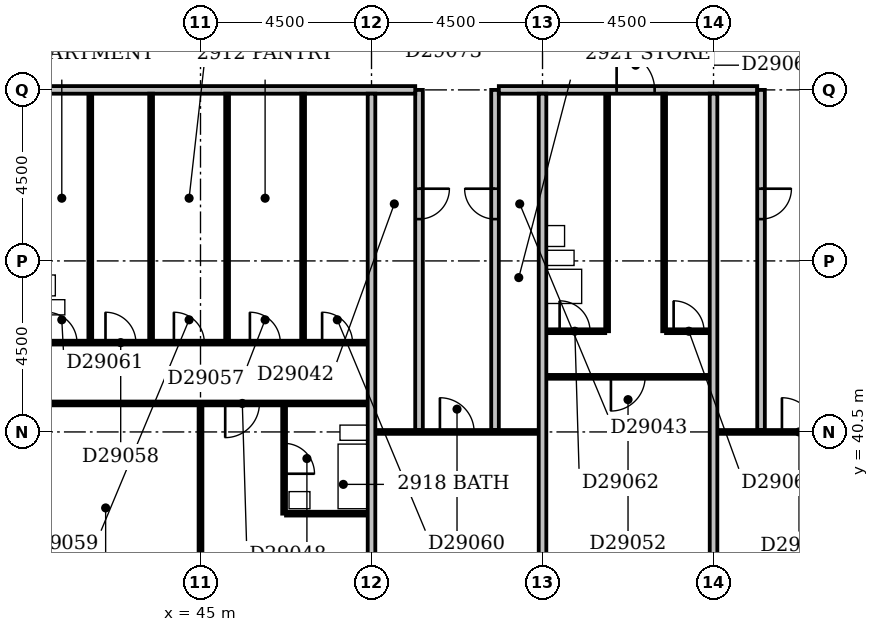
"""IFC4 building model, lengths in metres.
Left out: names, types, materials, properties, quantities, classifications, styles, units other than length and angle.
Written with IfcOpenShell. Run it as: python <this file> out.ifc"""

import sys

from ifc_helpers import new_model, si_unit, direction, frame, frame_2d, origin, place, context, subcontext, project, spatial, rectangle, extrude, element, fill, save


model = new_model("IFC4")
c1 = context("Model", 3, precision=1e-05, world=origin(), true_north=direction((0.0, 1.0)))
c2 = subcontext(c1, "Body", "Model", "MODEL_VIEW")
j1 = project(units=[si_unit("LENGTHUNIT", "METRE"), si_unit("PLANEANGLEUNIT", "RADIAN")], contexts=[c1])
p1 = place(None, origin())
s1 = spatial("IfcSite", under=j1, at=p1, CompositionType="ELEMENT")
p2 = place(p1, origin())
s2 = spatial("IfcBuilding", under=s1, at=p2, CompositionType="ELEMENT")
p3 = place(p2, frame((0.0, 0.0, 119.6)))
s3 = spatial("IfcBuildingStorey", under=s2, at=p3, CompositionType="ELEMENT", Elevation=119.6)
p4 = place(p3, frame((45.0, 36.5, 0.0), z_axis=(0.0, 0.0, 1.0), x_axis=(0.0, 1.0, 0.0)))
e1 = element("IfcWall", 1, at=p4, inside=s3, PredefinedType="PARTITIONING", context=c2, shape_type="SweptSolid", body=[
    extrude(rectangle(XDim=4.7, YDim=0.1, at=frame_2d((2.35, 0.0))), origin(), (0.0, 0.0, 1.0), 2.6),
])
p5 = place(p3, frame((49.5, 36.5, 0.0), z_axis=(0.0, 0.0, 1.0), x_axis=(0.0, 1.0, 0.0)))
e2 = element("IfcWall", 2, at=p5, inside=s3, PredefinedType="PARTITIONING", context=c2, shape_type="SweptSolid", body=[
    extrude(rectangle(XDim=12.9, YDim=0.2, at=frame_2d((6.45, 0.0))), origin(), (0.0, 0.0, 1.0), 3.3),
])
p6 = place(p3, frame((54.0, 36.5, 0.0), z_axis=(0.0, 0.0, 1.0), x_axis=(0.0, 1.0, 0.0)))
e3 = element("IfcWall", 3, at=p6, inside=s3, PredefinedType="PARTITIONING", context=c2, shape_type="SweptSolid", body=[
    extrude(rectangle(XDim=12.9, YDim=0.2, at=frame_2d((6.45, 0.0))), origin(), (0.0, 0.0, 1.0), 2.6),
])
p7 = place(p3, frame((58.5, 36.5, 0.0), z_axis=(0.0, 0.0, 1.0), x_axis=(0.0, 1.0, 0.0)))
e4 = element("IfcWall", 4, at=p7, inside=s3, PredefinedType="PARTITIONING", context=c2, shape_type="SweptSolid", body=[
    extrude(rectangle(XDim=12.9, YDim=0.2, at=frame_2d((6.45, 0.0))), origin(), (0.0, 0.0, 1.0), 3.3),
])
p8 = place(p3, frame((47.2, 38.35, 0.0), z_axis=(0.0, 0.0, 1.0), x_axis=(0.0, 1.0, 0.0)))
e5 = element("IfcWall", 5, at=p8, inside=s3, PredefinedType="PLUMBINGWALL", context=c2, shape_type="SweptSolid", body=[
    extrude(rectangle(XDim=2.85, YDim=0.1, at=frame_2d((1.425, 0.0))), origin(), (0.0, 0.0, 1.0), 3.3),
])
p9 = place(p8, frame((1.05, 0.0, 0.0)))
e6 = element("IfcOpeningElement", 6, at=p9, cuts=e5, PredefinedType="OPENING", context=c2, shape_type="SweptSolid", body=[
    extrude(rectangle(XDim=0.8, YDim=2.1, at=frame_2d((0.4, 1.05))), frame((0.0, 0.062, 0.0), z_axis=(0.0, -1.0, 0.0), x_axis=(1.0, 0.0, 0.0)), (0.0, 0.0, 1.0), 0.124),
])
p10 = place(p3, frame((47.25, 38.35, 0.0), z_axis=(0.0, 0.0, 1.0), x_axis=(1.0, 0.0, 0.0)))
e7 = element("IfcWall", 7, at=p10, inside=s3, PredefinedType="PLUMBINGWALL", context=c2, shape_type="SweptSolid", body=[
    extrude(rectangle(XDim=2.15, YDim=0.1, at=frame_2d((1.075, 0.0))), origin(), (0.0, 0.0, 1.0), 3.3),
])
p11 = place(p3, frame((49.6, 40.5, 0.0), z_axis=(0.0, 0.0, 1.0), x_axis=(1.0, 0.0, 0.0)))
e8 = element("IfcWall", 8, at=p11, inside=s3, PredefinedType="PARTITIONING", context=c2, shape_type="SweptSolid", body=[
    extrude(rectangle(XDim=4.3, YDim=0.1, at=frame_2d((2.15, 0.0))), origin(), (0.0, 0.0, 1.0), 3.3),
])
p12 = place(p11, frame((1.7, 0.0, 0.0)))
e9 = element("IfcOpeningElement", 9, at=p12, cuts=e8, PredefinedType="OPENING", context=c2, shape_type="SweptSolid", body=[
    extrude(rectangle(XDim=0.9, YDim=2.1, at=frame_2d((0.45, 1.05))), frame((0.0, 0.062, 0.0), z_axis=(0.0, -1.0, 0.0), x_axis=(1.0, 0.0, 0.0)), (0.0, 0.0, 1.0), 0.124),
])
p13 = place(p3, frame((58.6, 40.5, 0.0), z_axis=(0.0, 0.0, 1.0), x_axis=(1.0, 0.0, 0.0)))
e10 = element("IfcWall", 10, at=p13, inside=s3, PredefinedType="PARTITIONING", context=c2, shape_type="SweptSolid", body=[
    extrude(rectangle(XDim=4.3, YDim=0.1, at=frame_2d((2.15, 0.0))), origin(), (0.0, 0.0, 1.0), 3.3),
])
p14 = place(p13, frame((1.7, 0.0, 0.0)))
e11 = element("IfcOpeningElement", 11, at=p14, cuts=e10, PredefinedType="OPENING", context=c2, shape_type="SweptSolid", body=[
    extrude(rectangle(XDim=0.9, YDim=2.1, at=frame_2d((0.45, 1.05))), frame((0.0, 0.062, 0.0), z_axis=(0.0, -1.0, 0.0), x_axis=(1.0, 0.0, 0.0)), (0.0, 0.0, 1.0), 0.124),
])
p15 = place(p3, frame((50.75, 40.55, 0.0), z_axis=(0.0, 0.0, 1.0), x_axis=(0.0, 1.0, 0.0)))
e12 = element("IfcWall", 12, at=p15, inside=s3, PredefinedType="PARTITIONING", context=c2, shape_type="SweptSolid", body=[
    extrude(rectangle(XDim=8.95, YDim=0.2, at=frame_2d((4.475, 0.0))), origin(), (0.0, 0.0, 1.0), 3.3),
])
p16 = place(p15, frame((5.55, 0.0, 0.0)))
e13 = element("IfcOpeningElement", 13, at=p16, cuts=e12, PredefinedType="OPENING", context=c2, shape_type="SweptSolid", body=[
    extrude(rectangle(XDim=0.8, YDim=2.1, at=frame_2d((0.4, 1.05))), frame((0.0, 0.112, 0.0), z_axis=(0.0, -1.0, 0.0), x_axis=(1.0, 0.0, 0.0)), (0.0, 0.0, 1.0), 0.224),
])
p17 = place(p3, frame((52.75, 40.55, 0.0), z_axis=(0.0, 0.0, 1.0), x_axis=(0.0, 1.0, 0.0)))
e14 = element("IfcWall", 14, at=p17, inside=s3, PredefinedType="PARTITIONING", context=c2, shape_type="SweptSolid", body=[
    extrude(rectangle(XDim=8.95, YDim=0.2, at=frame_2d((4.475, 0.0))), origin(), (0.0, 0.0, 1.0), 3.3),
])
p18 = place(p17, frame((5.55, 0.0, 0.0)))
e15 = element("IfcOpeningElement", 15, at=p18, cuts=e14, PredefinedType="OPENING", context=c2, shape_type="SweptSolid", body=[
    extrude(rectangle(XDim=0.8, YDim=2.1, at=frame_2d((0.4, 1.05))), frame((0.0, 0.112, 0.0), z_axis=(0.0, -1.0, 0.0), x_axis=(1.0, 0.0, 0.0)), (0.0, 0.0, 1.0), 0.224),
])
p19 = place(p3, frame((59.75, 40.55, 0.0), z_axis=(0.0, 0.0, 1.0), x_axis=(0.0, 1.0, 0.0)))
e16 = element("IfcWall", 16, at=p19, inside=s3, PredefinedType="PARTITIONING", context=c2, shape_type="SweptSolid", body=[
    extrude(rectangle(XDim=8.95, YDim=0.2, at=frame_2d((4.475, 0.0))), origin(), (0.0, 0.0, 1.0), 3.3),
])
p20 = place(p19, frame((5.55, 0.0, 0.0)))
e17 = element("IfcOpeningElement", 17, at=p20, cuts=e16, PredefinedType="OPENING", context=c2, shape_type="SweptSolid", body=[
    extrude(rectangle(XDim=0.8, YDim=2.1, at=frame_2d((0.4, 1.05))), frame((0.0, 0.112, 0.0), z_axis=(0.0, -1.0, 0.0), x_axis=(1.0, 0.0, 0.0)), (0.0, 0.0, 1.0), 0.224),
])
p21 = place(p3, frame((31.6, 41.25, 0.0), z_axis=(0.0, 0.0, 1.0), x_axis=(1.0, 0.0, 0.0)))
e18 = element("IfcWall", 18, at=p21, inside=s3, PredefinedType="PARTITIONING", context=c2, shape_type="SweptSolid", body=[
    extrude(rectangle(XDim=17.8, YDim=0.1, at=frame_2d((8.9, 0.0))), origin(), (0.0, 0.0, 1.0), 3.3),
])
p22 = place(p21, frame((2.85, 0.0, 0.0)))
e19 = element("IfcOpeningElement", 19, at=p22, cuts=e18, PredefinedType="OPENING", context=c2, shape_type="SweptSolid", body=[
    extrude(rectangle(XDim=0.9, YDim=2.1, at=frame_2d((0.45, 1.05))), frame((0.0, 0.062, 0.0), z_axis=(0.0, -1.0, 0.0), x_axis=(1.0, 0.0, 0.0)), (0.0, 0.0, 1.0), 0.124),
])
p23 = place(p21, frame((8.4, 0.0, 0.0)))
e20 = element("IfcOpeningElement", 20, at=p23, cuts=e18, PredefinedType="OPENING", context=c2, shape_type="SweptSolid", body=[
    extrude(rectangle(XDim=0.9, YDim=2.1, at=frame_2d((0.45, 1.05))), frame((0.0, 0.062, 0.0), z_axis=(0.0, -1.0, 0.0), x_axis=(1.0, 0.0, 0.0)), (0.0, 0.0, 1.0), 0.124),
])
p24 = place(p21, frame((14.05, 0.0, 0.0)))
e21 = element("IfcOpeningElement", 21, at=p24, cuts=e18, PredefinedType="OPENING", context=c2, shape_type="SweptSolid", body=[
    extrude(rectangle(XDim=0.9, YDim=2.1, at=frame_2d((0.45, 1.05))), frame((0.0, 0.062, 0.0), z_axis=(0.0, -1.0, 0.0), x_axis=(1.0, 0.0, 0.0)), (0.0, 0.0, 1.0), 0.124),
])
p25 = place(p3, frame((54.1, 41.95, 0.0), z_axis=(0.0, 0.0, 1.0), x_axis=(1.0, 0.0, 0.0)))
e22 = element("IfcWall", 22, at=p25, inside=s3, PredefinedType="PARTITIONING", context=c2, shape_type="SweptSolid", body=[
    extrude(rectangle(XDim=4.3, YDim=0.1, at=frame_2d((2.15, 0.0))), origin(), (0.0, 0.0, 1.0), 3.3),
])
p26 = place(p25, frame((1.7, 0.0, 0.0)))
e23 = element("IfcOpeningElement", 23, at=p26, cuts=e22, PredefinedType="OPENING", context=c2, shape_type="SweptSolid", body=[
    extrude(rectangle(XDim=0.9, YDim=2.1, at=frame_2d((0.45, 1.05))), frame((0.0, 0.062, 0.0), z_axis=(0.0, -1.0, 0.0), x_axis=(1.0, 0.0, 0.0)), (0.0, 0.0, 1.0), 0.124),
])
p27 = place(p3, frame((38.25, 42.85, 0.0), z_axis=(0.0, 0.0, 1.0), x_axis=(1.0, 0.0, 0.0)))
e24 = element("IfcWall", 24, at=p27, inside=s3, PredefinedType="PARTITIONING", context=c2, shape_type="SweptSolid", body=[
    extrude(rectangle(XDim=11.15, YDim=0.1, at=frame_2d((5.575, 0.0))), origin(), (0.0, 0.0, 1.0), 3.3),
])
p28 = place(p27, frame((0.75, 0.0, 0.0)))
e25 = element("IfcOpeningElement", 25, at=p28, cuts=e24, PredefinedType="OPENING", context=c2, shape_type="SweptSolid", body=[
    extrude(rectangle(XDim=0.8, YDim=2.1, at=frame_2d((0.4, 1.05))), frame((0.0, 0.062, 0.0), z_axis=(0.0, -1.0, 0.0), x_axis=(1.0, 0.0, 0.0)), (0.0, 0.0, 1.0), 0.124),
])
p29 = place(p27, frame((8.05, 0.0, 0.0)))
e26 = element("IfcOpeningElement", 26, at=p29, cuts=e24, PredefinedType="OPENING", context=c2, shape_type="SweptSolid", body=[
    extrude(rectangle(XDim=0.8, YDim=2.1, at=frame_2d((0.4, 1.05))), frame((0.0, 0.062, 0.0), z_axis=(0.0, -1.0, 0.0), x_axis=(1.0, 0.0, 0.0)), (0.0, 0.0, 1.0), 0.124),
])
p30 = place(p27, frame((4.25, 0.0, 0.0)))
e27 = element("IfcOpeningElement", 27, at=p30, cuts=e24, PredefinedType="OPENING", context=c2, shape_type="SweptSolid", body=[
    extrude(rectangle(XDim=0.8, YDim=2.1, at=frame_2d((0.4, 1.05))), frame((0.0, 0.062, 0.0), z_axis=(0.0, -1.0, 0.0), x_axis=(1.0, 0.0, 0.0)), (0.0, 0.0, 1.0), 0.124),
])
p31 = place(p27, frame((6.05, 0.0, 0.0)))
e28 = element("IfcOpeningElement", 28, at=p31, cuts=e24, PredefinedType="OPENING", context=c2, shape_type="SweptSolid", body=[
    extrude(rectangle(XDim=0.8, YDim=2.1, at=frame_2d((0.4, 1.05))), frame((0.0, 0.062, 0.0), z_axis=(0.0, -1.0, 0.0), x_axis=(1.0, 0.0, 0.0)), (0.0, 0.0, 1.0), 0.124),
])
p32 = place(p27, frame((9.95, 0.0, 0.0)))
e29 = element("IfcOpeningElement", 29, at=p32, cuts=e24, PredefinedType="OPENING", context=c2, shape_type="SweptSolid", body=[
    extrude(rectangle(XDim=0.8, YDim=2.1, at=frame_2d((0.4, 1.05))), frame((0.0, 0.062, 0.0), z_axis=(0.0, -1.0, 0.0), x_axis=(1.0, 0.0, 0.0)), (0.0, 0.0, 1.0), 0.124),
])
p33 = place(p27, frame((2.7, 0.0, 0.0)))
e30 = element("IfcOpeningElement", 30, at=p33, cuts=e24, PredefinedType="OPENING", context=c2, shape_type="SweptSolid", body=[
    extrude(rectangle(XDim=0.8, YDim=2.1, at=frame_2d((0.4, 1.05))), frame((0.0, 0.062, 0.0), z_axis=(0.0, -1.0, 0.0), x_axis=(1.0, 0.0, 0.0)), (0.0, 0.0, 1.0), 0.124),
])
p34 = place(p3, frame((42.1, 42.9, 0.0), z_axis=(0.0, 0.0, 1.0), x_axis=(0.0, 1.0, 0.0)))
e31 = element("IfcWall", 31, at=p34, inside=s3, PredefinedType="PLUMBINGWALL", context=c2, shape_type="SweptSolid", body=[
    extrude(rectangle(XDim=6.5, YDim=0.1, at=frame_2d((3.25, 0.0))), origin(), (0.0, 0.0, 1.0), 3.3),
])
p35 = place(p3, frame((43.7, 42.9, 0.0), z_axis=(0.0, 0.0, 1.0), x_axis=(0.0, 1.0, 0.0)))
e32 = element("IfcWall", 32, at=p35, inside=s3, PredefinedType="PARTITIONING", context=c2, shape_type="SweptSolid", body=[
    extrude(rectangle(XDim=6.5, YDim=0.1, at=frame_2d((3.25, 0.0))), origin(), (0.0, 0.0, 1.0), 3.3),
])
p36 = place(p3, frame((45.7, 42.9, 0.0), z_axis=(0.0, 0.0, 1.0), x_axis=(0.0, 1.0, 0.0)))
e33 = element("IfcWall", 33, at=p36, inside=s3, PredefinedType="PARTITIONING", context=c2, shape_type="SweptSolid", body=[
    extrude(rectangle(XDim=6.5, YDim=0.1, at=frame_2d((3.25, 0.0))), origin(), (0.0, 0.0, 1.0), 2.6),
])
p37 = place(p3, frame((47.7, 42.9, 0.0), z_axis=(0.0, 0.0, 1.0), x_axis=(0.0, 1.0, 0.0)))
e34 = element("IfcWall", 34, at=p37, inside=s3, PredefinedType="PARTITIONING", context=c2, shape_type="SweptSolid", body=[
    extrude(rectangle(XDim=6.5, YDim=0.1, at=frame_2d((3.25, 0.0))), origin(), (0.0, 0.0, 1.0), 3.3),
])
p38 = place(p3, frame((54.1, 43.15, 0.0), z_axis=(0.0, 0.0, 1.0), x_axis=(1.0, 0.0, 0.0)))
e35 = element("IfcWall", 35, at=p38, inside=s3, PredefinedType="PARTITIONING", context=c2, shape_type="SweptSolid", body=[
    extrude(rectangle(XDim=1.55, YDim=0.1, at=frame_2d((0.775, 0.0))), origin(), (0.0, 0.0, 1.0), 3.3),
])
p39 = place(p38, frame((0.35, 0.0, 0.0)))
e36 = element("IfcOpeningElement", 36, at=p39, cuts=e35, PredefinedType="OPENING", context=c2, shape_type="SweptSolid", body=[
    extrude(rectangle(XDim=0.8, YDim=2.1, at=frame_2d((0.4, 1.05))), frame((0.0, 0.062, 0.0), z_axis=(0.0, -1.0, 0.0), x_axis=(1.0, 0.0, 0.0)), (0.0, 0.0, 1.0), 0.124),
])
p40 = place(p3, frame((55.7, 43.15, 0.0), z_axis=(0.0, 0.0, 1.0), x_axis=(0.0, 1.0, 0.0)))
e37 = element("IfcWall", 37, at=p40, inside=s3, PredefinedType="PLUMBINGWALL", context=c2, shape_type="SweptSolid", body=[
    extrude(rectangle(XDim=6.25, YDim=0.1, at=frame_2d((3.125, 0.0))), origin(), (0.0, 0.0, 1.0), 3.3),
])
p41 = place(p3, frame((57.2, 43.15, 0.0), z_axis=(0.0, 0.0, 1.0), x_axis=(0.0, 1.0, 0.0)))
e38 = element("IfcWall", 38, at=p41, inside=s3, PredefinedType="PARTITIONING", context=c2, shape_type="SweptSolid", body=[
    extrude(rectangle(XDim=6.25, YDim=0.1, at=frame_2d((3.125, 0.0))), origin(), (0.0, 0.0, 1.0), 3.3),
])
p42 = place(p3, frame((57.25, 43.15, 0.0), z_axis=(0.0, 0.0, 1.0), x_axis=(1.0, 0.0, 0.0)))
e39 = element("IfcWall", 39, at=p42, inside=s3, PredefinedType="PARTITIONING", context=c2, shape_type="SweptSolid", body=[
    extrude(rectangle(XDim=1.15, YDim=0.1, at=frame_2d((0.575, 0.0))), origin(), (0.0, 0.0, 1.0), 3.3),
])
p43 = place(p42, frame((0.2, 0.0, 0.0)))
e40 = element("IfcOpeningElement", 40, at=p43, cuts=e39, PredefinedType="OPENING", context=c2, shape_type="SweptSolid", body=[
    extrude(rectangle(XDim=0.8, YDim=2.1, at=frame_2d((0.4, 1.05))), frame((0.0, 0.062, 0.0), z_axis=(0.0, -1.0, 0.0), x_axis=(1.0, 0.0, 0.0)), (0.0, 0.0, 1.0), 0.124),
])
p44 = place(p3, frame((9.1, 49.5, 0.0), z_axis=(0.0, 0.0, 1.0), x_axis=(1.0, 0.0, 0.0)))
e41 = element("IfcWall", 41, at=p44, inside=s3, PredefinedType="PARTITIONING", context=c2, shape_type="SweptSolid", body=[
    extrude(rectangle(XDim=41.55, YDim=0.2, at=frame_2d((20.775, 0.0))), origin(), (0.0, 0.0, 1.0), 3.3),
])
p45 = place(p44, frame((13.7, 0.0, 0.0)))
e42 = element("IfcOpeningElement", 42, at=p45, cuts=e41, PredefinedType="OPENING", context=c2, shape_type="SweptSolid", body=[
    extrude(rectangle(XDim=1.0, YDim=2.1, at=frame_2d((0.5, 1.05))), frame((0.0, 0.112, 0.0), z_axis=(0.0, -1.0, 0.0), x_axis=(1.0, 0.0, 0.0)), (0.0, 0.0, 1.0), 0.224),
])
p46 = place(p44, frame((27.8, 0.0, 0.0)))
e43 = element("IfcOpeningElement", 43, at=p46, cuts=e41, PredefinedType="OPENING", context=c2, shape_type="SweptSolid", body=[
    extrude(rectangle(XDim=1.0, YDim=2.1, at=frame_2d((0.5, 1.05))), frame((0.0, 0.112, 0.0), z_axis=(0.0, -1.0, 0.0), x_axis=(1.0, 0.0, 0.0)), (0.0, 0.0, 1.0), 0.224),
])
p47 = place(p44, frame((8.4, 0.0, 0.0)))
e44 = element("IfcOpeningElement", 44, at=p47, cuts=e41, PredefinedType="OPENING", context=c2, shape_type="SweptSolid", body=[
    extrude(rectangle(XDim=0.9, YDim=2.1, at=frame_2d((0.45, 1.05))), frame((0.0, 0.112, 0.0), z_axis=(0.0, -1.0, 0.0), x_axis=(1.0, 0.0, 0.0)), (0.0, 0.0, 1.0), 0.224),
])
p48 = place(p3, frame((52.85, 49.5, 0.0), z_axis=(0.0, 0.0, 1.0), x_axis=(1.0, 0.0, 0.0)))
e45 = element("IfcWall", 45, at=p48, inside=s3, PredefinedType="PARTITIONING", context=c2, shape_type="SweptSolid", body=[
    extrude(rectangle(XDim=6.8, YDim=0.2, at=frame_2d((3.4, 0.0))), origin(), (0.0, 0.0, 1.0), 3.3),
])
p49 = place(p48, frame((3.1, 0.0, 0.0)))
e46 = element("IfcOpeningElement", 46, at=p49, cuts=e45, PredefinedType="OPENING", context=c2, shape_type="SweptSolid", body=[
    extrude(rectangle(XDim=1.0, YDim=2.1, at=frame_2d((0.5, 1.05))), frame((0.0, 0.112, 0.0), z_axis=(0.0, -1.0, 0.0), x_axis=(1.0, 0.0, 0.0)), (0.0, 0.0, 1.0), 0.224),
])
p50 = place(p9, frame((0.8, 0.0, 0.0), z_axis=(0.0, 0.0, 1.0), x_axis=(-1.0, 0.0, 0.0)))
e47 = element("IfcDoor", 47, at=p50, inside=s3, OperationType="SINGLE_SWING_RIGHT", PredefinedType="DOOR", context=c2, shape_type="SweptSolid", body=[
    extrude(rectangle(XDim=0.8, YDim=2.1, at=frame_2d((0.4, 1.05))), frame((0.0, 0.025, 0.0), z_axis=(0.0, -1.0, 0.0), x_axis=(1.0, 0.0, 0.0)), (0.0, 0.0, 1.0), 0.05),
])
fill(e6, e47)
p51 = place(p12, origin())
e48 = element("IfcDoor", 48, at=p51, inside=s3, OperationType="SINGLE_SWING_LEFT", PredefinedType="DOOR", context=c2, shape_type="SweptSolid", body=[
    extrude(rectangle(XDim=0.9, YDim=2.1, at=frame_2d((0.45, 1.05))), frame((0.0, 0.025, 0.0), z_axis=(0.0, -1.0, 0.0), x_axis=(1.0, 0.0, 0.0)), (0.0, 0.0, 1.0), 0.05),
])
fill(e9, e48)
p52 = place(p14, origin())
e49 = element("IfcDoor", 49, at=p52, inside=s3, OperationType="SINGLE_SWING_LEFT", PredefinedType="DOOR", context=c2, shape_type="SweptSolid", body=[
    extrude(rectangle(XDim=0.9, YDim=2.1, at=frame_2d((0.45, 1.05))), frame((0.0, 0.025, 0.0), z_axis=(0.0, -1.0, 0.0), x_axis=(1.0, 0.0, 0.0)), (0.0, 0.0, 1.0), 0.05),
])
fill(e11, e49)
p53 = place(p16, origin())
e50 = element("IfcDoor", 50, at=p53, inside=s3, OperationType="SINGLE_SWING_RIGHT", PredefinedType="DOOR", context=c2, shape_type="SweptSolid", body=[
    extrude(rectangle(XDim=0.8, YDim=2.1, at=frame_2d((0.4, 1.05))), frame((0.0, 0.025, 0.0), z_axis=(0.0, -1.0, 0.0), x_axis=(1.0, 0.0, 0.0)), (0.0, 0.0, 1.0), 0.05),
])
fill(e13, e50)
p54 = place(p18, frame((0.8, 0.0, 0.0), z_axis=(0.0, 0.0, 1.0), x_axis=(-1.0, 0.0, 0.0)))
e51 = element("IfcDoor", 51, at=p54, inside=s3, OperationType="SINGLE_SWING_LEFT", PredefinedType="DOOR", context=c2, shape_type="SweptSolid", body=[
    extrude(rectangle(XDim=0.8, YDim=2.1, at=frame_2d((0.4, 1.05))), frame((0.0, 0.025, 0.0), z_axis=(0.0, -1.0, 0.0), x_axis=(1.0, 0.0, 0.0)), (0.0, 0.0, 1.0), 0.05),
])
fill(e15, e51)
p55 = place(p20, origin())
e52 = element("IfcDoor", 52, at=p55, inside=s3, OperationType="SINGLE_SWING_RIGHT", PredefinedType="DOOR", context=c2, shape_type="SweptSolid", body=[
    extrude(rectangle(XDim=0.8, YDim=2.1, at=frame_2d((0.4, 1.05))), frame((0.0, 0.025, 0.0), z_axis=(0.0, -1.0, 0.0), x_axis=(1.0, 0.0, 0.0)), (0.0, 0.0, 1.0), 0.05),
])
fill(e17, e52)
p56 = place(p24, frame((0.9, 0.0, 0.0), z_axis=(0.0, 0.0, 1.0), x_axis=(-1.0, 0.0, 0.0)))
e53 = element("IfcDoor", 53, at=p56, inside=s3, OperationType="SINGLE_SWING_RIGHT", PredefinedType="DOOR", context=c2, shape_type="SweptSolid", body=[
    extrude(rectangle(XDim=0.9, YDim=2.1, at=frame_2d((0.45, 1.05))), frame((0.0, 0.025, 0.0), z_axis=(0.0, -1.0, 0.0), x_axis=(1.0, 0.0, 0.0)), (0.0, 0.0, 1.0), 0.05),
])
fill(e21, e53)
p57 = place(p26, frame((0.9, 0.0, 0.0), z_axis=(0.0, 0.0, 1.0), x_axis=(-1.0, 0.0, 0.0)))
e54 = element("IfcDoor", 54, at=p57, inside=s3, OperationType="SINGLE_SWING_RIGHT", PredefinedType="DOOR", context=c2, shape_type="SweptSolid", body=[
    extrude(rectangle(XDim=0.9, YDim=2.1, at=frame_2d((0.45, 1.05))), frame((0.0, 0.025, 0.0), z_axis=(0.0, -1.0, 0.0), x_axis=(1.0, 0.0, 0.0)), (0.0, 0.0, 1.0), 0.05),
])
fill(e23, e54)
p58 = place(p29, origin())
e55 = element("IfcDoor", 55, at=p58, inside=s3, OperationType="SINGLE_SWING_LEFT", PredefinedType="DOOR", context=c2, shape_type="SweptSolid", body=[
    extrude(rectangle(XDim=0.8, YDim=2.1, at=frame_2d((0.4, 1.05))), frame((0.0, 0.025, 0.0), z_axis=(0.0, -1.0, 0.0), x_axis=(1.0, 0.0, 0.0)), (0.0, 0.0, 1.0), 0.05),
])
fill(e26, e55)
p59 = place(p30, origin())
e56 = element("IfcDoor", 56, at=p59, inside=s3, OperationType="SINGLE_SWING_LEFT", PredefinedType="DOOR", context=c2, shape_type="SweptSolid", body=[
    extrude(rectangle(XDim=0.8, YDim=2.1, at=frame_2d((0.4, 1.05))), frame((0.0, 0.025, 0.0), z_axis=(0.0, -1.0, 0.0), x_axis=(1.0, 0.0, 0.0)), (0.0, 0.0, 1.0), 0.05),
])
fill(e27, e56)
p60 = place(p31, origin())
e57 = element("IfcDoor", 57, at=p60, inside=s3, OperationType="SINGLE_SWING_LEFT", PredefinedType="DOOR", context=c2, shape_type="SweptSolid", body=[
    extrude(rectangle(XDim=0.8, YDim=2.1, at=frame_2d((0.4, 1.05))), frame((0.0, 0.025, 0.0), z_axis=(0.0, -1.0, 0.0), x_axis=(1.0, 0.0, 0.0)), (0.0, 0.0, 1.0), 0.05),
])
fill(e28, e57)
p61 = place(p32, origin())
e58 = element("IfcDoor", 58, at=p61, inside=s3, OperationType="SINGLE_SWING_LEFT", PredefinedType="DOOR", context=c2, shape_type="SweptSolid", body=[
    extrude(rectangle(XDim=0.8, YDim=2.1, at=frame_2d((0.4, 1.05))), frame((0.0, 0.025, 0.0), z_axis=(0.0, -1.0, 0.0), x_axis=(1.0, 0.0, 0.0)), (0.0, 0.0, 1.0), 0.05),
])
fill(e29, e58)
p62 = place(p33, origin())
e59 = element("IfcDoor", 59, at=p62, inside=s3, OperationType="SINGLE_SWING_LEFT", PredefinedType="DOOR", context=c2, shape_type="SweptSolid", body=[
    extrude(rectangle(XDim=0.8, YDim=2.1, at=frame_2d((0.4, 1.05))), frame((0.0, 0.025, 0.0), z_axis=(0.0, -1.0, 0.0), x_axis=(1.0, 0.0, 0.0)), (0.0, 0.0, 1.0), 0.05),
])
fill(e30, e59)
p63 = place(p39, origin())
e60 = element("IfcDoor", 60, at=p63, inside=s3, OperationType="SINGLE_SWING_LEFT", PredefinedType="DOOR", context=c2, shape_type="SweptSolid", body=[
    extrude(rectangle(XDim=0.8, YDim=2.1, at=frame_2d((0.4, 1.05))), frame((0.0, 0.025, 0.0), z_axis=(0.0, -1.0, 0.0), x_axis=(1.0, 0.0, 0.0)), (0.0, 0.0, 1.0), 0.05),
])
fill(e36, e60)
p64 = place(p43, origin())
e61 = element("IfcDoor", 61, at=p64, inside=s3, OperationType="SINGLE_SWING_LEFT", PredefinedType="DOOR", context=c2, shape_type="SweptSolid", body=[
    extrude(rectangle(XDim=0.8, YDim=2.1, at=frame_2d((0.4, 1.05))), frame((0.0, 0.025, 0.0), z_axis=(0.0, -1.0, 0.0), x_axis=(1.0, 0.0, 0.0)), (0.0, 0.0, 1.0), 0.05),
])
fill(e40, e61)
p65 = place(p49, origin())
e62 = element("IfcDoor", 62, at=p65, inside=s3, OperationType="SINGLE_SWING_LEFT", PredefinedType="DOOR", context=c2, shape_type="SweptSolid", body=[
    extrude(rectangle(XDim=1.0, YDim=2.1, at=frame_2d((0.5, 1.05))), frame((0.0, 0.025, 0.0), z_axis=(0.0, -1.0, 0.0), x_axis=(1.0, 0.0, 0.0)), (0.0, 0.0, 1.0), 0.05),
])
fill(e46, e62)
save(model, sys.argv[1])
